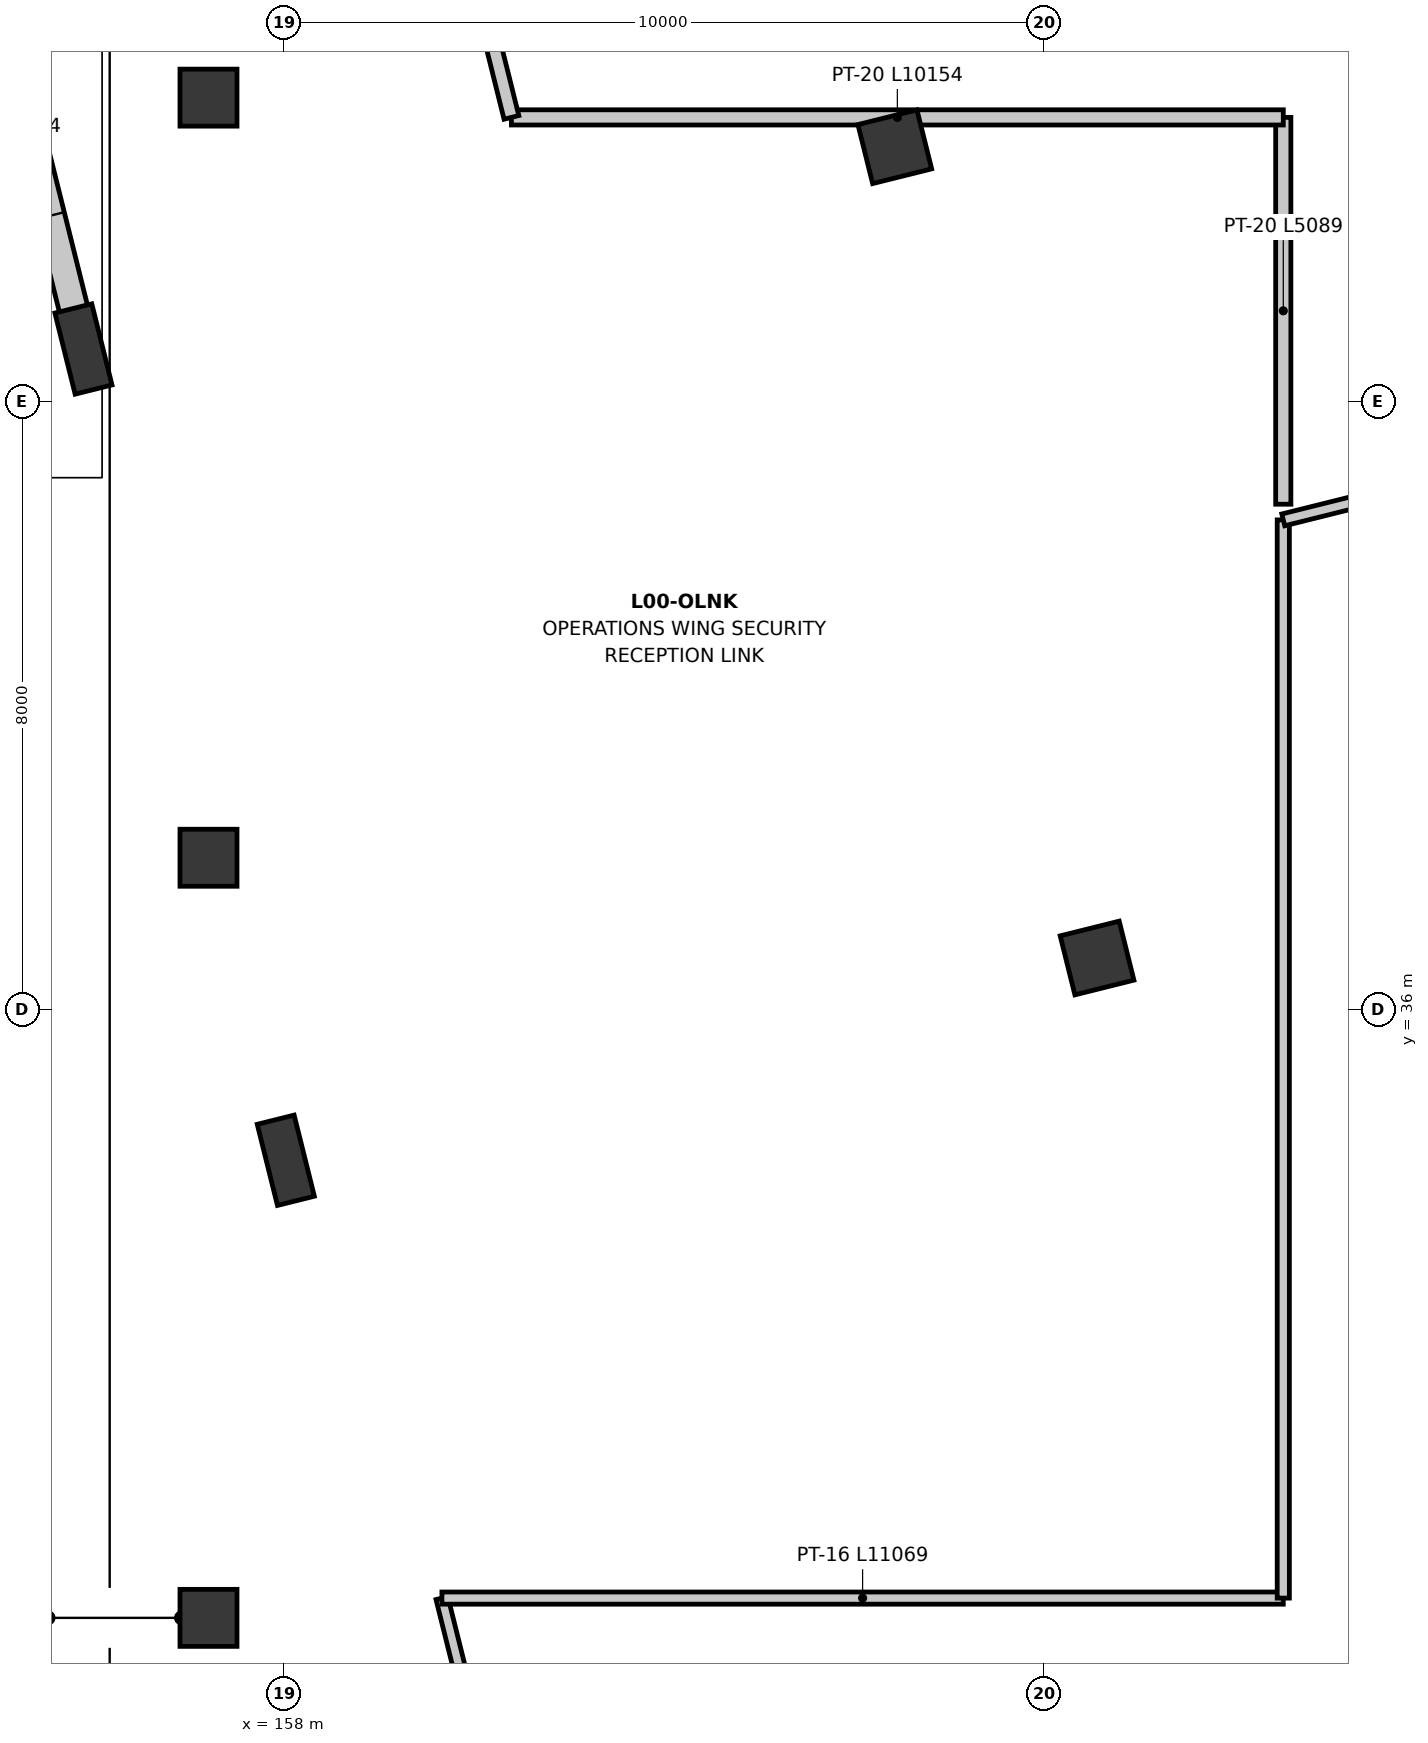
"""IFC4 building model, lengths in metres.
Left out: names, types, materials, properties, quantities, classifications, styles, units other than length and angle.
Written with IfcOpenShell. Run it as: python <this file> out.ifc"""

import sys

from ifc_helpers import new_model, si_unit, direction, frame, frame_2d, origin, origin_2d, place, context, subcontext, project, spatial, rectangle, extrude, element, save


model = new_model("IFC4")
c1 = context("Model", 3, precision=1e-05, world=origin(), true_north=direction((0.0, 1.0)))
c2 = subcontext(c1, "Body", "Model", "MODEL_VIEW")
j1 = project(units=[si_unit("LENGTHUNIT", "METRE"), si_unit("PLANEANGLEUNIT", "RADIAN")], contexts=[c1])
p1 = place(None, origin())
s1 = spatial("IfcSite", under=j1, at=p1, CompositionType="ELEMENT")
p2 = place(p1, origin())
s2 = spatial("IfcBuilding", under=s1, at=p2, CompositionType="ELEMENT")
p3 = place(p2, origin())
s3 = spatial("IfcBuildingStorey", under=s2, at=p3, CompositionType="ELEMENT", Elevation=0.0)
for number, where, z_axis, x_axis in (
    (1, (158.017, 34.02, 0.0), (0.0, 0.0, 1.0), (0.97, 0.242, 0.0)),
    (2, (155.355, 44.693, 0.0), (0.0, 0.0, 1.0), (0.97, 0.242, 0.0)),
):
    element("IfcColumn", number, at=place(p3, frame(where, z_axis=z_axis, x_axis=x_axis)), inside=s3, PredefinedType="COLUMN", context=c2, shape_type="SweptSolid", body=[
        extrude(rectangle(XDim=0.5, YDim=1.1, at=origin_2d()), origin(), (0.0, 0.0, 1.0), 6.0),
    ])
for number, where, z_axis, x_axis in (
    (3, (168.69, 36.681, 0.0), (0.0, 0.0, 1.0), (0.97, 0.242, 0.0)),
    (4, (166.029, 47.354, 0.0), (0.0, 0.0, 1.0), (0.97, 0.242, 0.0)),
):
    element("IfcColumn", number, at=place(p3, frame(where, z_axis=z_axis, x_axis=x_axis)), inside=s3, PredefinedType="COLUMN", context=c2, shape_type="SweptSolid", body=[
        extrude(rectangle(XDim=0.8, YDim=0.8, at=origin_2d()), origin(), (0.0, 0.0, 1.0), 6.0),
    ])
for number, where, z_axis, x_axis in (
    (5, (157.0, 28.0, 0.0), (0.0, 0.0, 1.0), (1.0, 0.0, 0.0)),
    (6, (157.0, 38.0, 0.0), (0.0, 0.0, 1.0), (1.0, 0.0, 0.0)),
    (7, (157.0, 48.0, 0.0), (0.0, 0.0, 1.0), (1.0, 0.0, 0.0)),
):
    element("IfcColumn", number, at=place(p3, frame(where, z_axis=z_axis, x_axis=x_axis)), inside=s3, PredefinedType="COLUMN", context=c2, shape_type="SweptSolid", body=[
        extrude(rectangle(XDim=0.75, YDim=0.75, at=origin_2d()), origin(), (0.0, 0.0, 1.0), 6.0),
    ])
p4 = place(p3, frame((152.819, 54.866, 0.0), z_axis=(0.0, 0.0, 1.0), x_axis=(0.241921955253, -0.970295711403, 0.0)))
e8 = element("IfcWall", 8, at=p4, inside=s3, PredefinedType="STANDARD", context=c2, shape_type="SweptSolid", body=[
    extrude(rectangle(XDim=9.97, YDim=0.38, at=frame_2d((4.985, 0.0))), origin(), (0.0, 0.0, 1.0), 5.635),
])
p5 = place(p4, frame((1.292, 0.0, 0.85)))
e9 = element("IfcOpeningElement", 9, at=p5, cuts=e8, PredefinedType="OPENING", context=c2, shape_type="SweptSolid", body=[
    extrude(rectangle(XDim=2.4, YDim=1.8, at=frame_2d((1.2, 0.9))), frame((0.0, 0.2, 0.0), z_axis=(0.0, -1.0, 0.0), x_axis=(1.0, 0.0, 0.0)), (0.0, 0.0, 1.0), 0.4),
])
p6 = place(p4, frame((6.277, 0.0, 0.85)))
e10 = element("IfcOpeningElement", 10, at=p6, cuts=e8, PredefinedType="OPENING", context=c2, shape_type="SweptSolid", body=[
    extrude(rectangle(XDim=2.4, YDim=1.8, at=frame_2d((1.2, 0.9))), frame((0.0, 0.2, 0.0), z_axis=(0.0, -1.0, 0.0), x_axis=(1.0, 0.0, 0.0)), (0.0, 0.0, 1.0), 0.4),
])
p7 = place(p3, frame((162.76, 17.476, 0.0), z_axis=(0.0, 0.0, 1.0), x_axis=(-0.241921637388, 0.970295790655, 0.0)))
e11 = element("IfcWall", 11, at=p7, inside=s3, PredefinedType="PARTITIONING", context=c2, shape_type="SweptSolid", body=[
    extrude(rectangle(XDim=11.114, YDim=0.16, at=frame_2d((5.557, 0.0))), origin(), (0.0, 0.0, 1.0), 5.025),
])
p8 = place(p3, frame((160.071, 28.26, 0.0), z_axis=(0.0, 0.0, 1.0), x_axis=(1.0, 0.0, 0.0)))
e12 = element("IfcWall", 12, at=p8, inside=s3, PredefinedType="PARTITIONING", context=c2, shape_type="SweptSolid", body=[
    extrude(rectangle(XDim=11.069, YDim=0.16, at=frame_2d((5.535, 0.0))), origin(), (0.0, 0.0, 1.0), 5.015),
])
p9 = place(p3, frame((171.14, 28.26, 0.0), z_axis=(0.0, 0.0, 1.0), x_axis=(0.0, 1.0, 0.0)))
e13 = element("IfcWall", 13, at=p9, inside=s3, PredefinedType="PARTITIONING", context=c2, shape_type="SweptSolid", body=[
    extrude(rectangle(XDim=14.185, YDim=0.16, at=frame_2d((7.093, 0.0))), origin(), (0.0, 0.0, 1.0), 4.515),
])
p10 = place(p3, frame((171.14, 42.445, 0.0), z_axis=(0.0, 0.0, 1.0), x_axis=(0.970296620791, 0.241918307867, 0.0)))
e14 = element("IfcWall", 14, at=p10, inside=s3, PredefinedType="PARTITIONING", context=c2, shape_type="SweptSolid", body=[
    extrude(rectangle(XDim=14.828, YDim=0.16, at=frame_2d((7.414, 0.0))), origin(), (0.0, 0.0, 1.0), 5.025),
])
p11 = place(p3, frame((171.14, 42.651, 0.0), z_axis=(0.0, 0.0, 1.0), x_axis=(0.0, 1.0, 0.0)))
e15 = element("IfcWall", 15, at=p11, inside=s3, PredefinedType="PARTITIONING", context=c2, shape_type="SweptSolid", body=[
    extrude(rectangle(XDim=5.089, YDim=0.2, at=frame_2d((2.545, 0.0))), origin(), (0.0, 0.0, 1.0), 5.125),
])
p12 = place(p3, frame((171.14, 47.74, 0.0), z_axis=(0.0, 0.0, 1.0), x_axis=(-1.0, 0.0, 0.0)))
e16 = element("IfcWall", 16, at=p12, inside=s3, PredefinedType="PARTITIONING", context=c2, shape_type="SweptSolid", body=[
    extrude(rectangle(XDim=10.155, YDim=0.2, at=frame_2d((5.077, 0.0))), origin(), (0.0, 0.0, 1.0), 5.025),
])
p13 = place(p3, frame((160.986, 47.74, 0.0), z_axis=(0.0, 0.0, 1.0), x_axis=(-0.241921371326, 0.970295856992, 0.0)))
e17 = element("IfcWall", 17, at=p13, inside=s3, PredefinedType="PARTITIONING", context=c2, shape_type="SweptSolid", body=[
    extrude(rectangle(XDim=19.806, YDim=0.2, at=frame_2d((9.903, 0.0))), origin(), (0.0, 0.0, 1.0), 5.63),
])
save(model, sys.argv[1])
